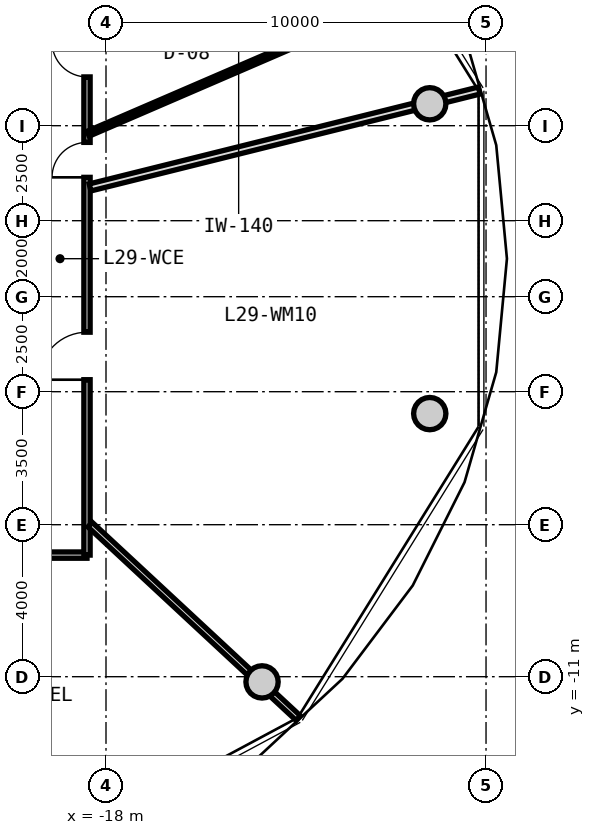
"""IFC4 building model, lengths in metres.
Left out: names, types, materials, properties, quantities, classifications, styles, units other than length and angle.
Written with IfcOpenShell. Run it as: python <this file> out.ifc"""

import sys

from ifc_helpers import new_model, si_unit, direction, frame, frame_2d, origin, origin_2d, place, context, subcontext, project, spatial, rectangle, circle, extrude, source, transform, mapped, element, fill, save


model = new_model("IFC4")
c1 = context("Model", 3, precision=1e-05, world=origin(), true_north=direction((0.0, 1.0)))
c2 = subcontext(c1, "Body", "Model", "MODEL_VIEW")
j1 = project(units=[si_unit("LENGTHUNIT", "METRE"), si_unit("PLANEANGLEUNIT", "RADIAN")], contexts=[c1])
p1 = place(None, origin())
s1 = spatial("IfcSite", under=j1, at=p1, CompositionType="ELEMENT")
p2 = place(p1, origin())
s2 = spatial("IfcBuilding", under=s1, at=p2, CompositionType="ELEMENT")
p3 = place(p2, frame((0.0, 0.0, 96.25)))
s3 = spatial("IfcBuildingStorey", under=s2, at=p3, CompositionType="ELEMENT", Elevation=96.25)
m1 = source(origin(), c2, "Body", "SweptSolid", [
    extrude(circle(Radius=0.425, at=origin_2d()), origin(), (0.0, 0.0, 1.0), 3.05),
])
for number, where, z_axis, x_axis in (
    (1, (-9.481, 4.076, 0.0), (0.0, 0.0, 1.0), (1.0, 0.0, 0.0)),
    (2, (-13.894, -11.137, 0.0), (0.0, 0.0, 1.0), (1.0, 0.0, 0.0)),
    (3, (-9.481, -4.076, 0.0), (0.0, 0.0, 1.0), (1.0, 0.0, 0.0)),
):
    element("IfcColumn", number, at=place(p3, frame(where, z_axis=z_axis, x_axis=x_axis)), inside=s3, PredefinedType="COLUMN", context=c2, shape_type="MappedRepresentation", body=[
        mapped(m1, transform((0.0, 0.0, 0.0), x_axis=(1.0, 0.0, 0.0), y_axis=(0.0, 1.0, 0.0), z_axis=(0.0, 0.0, 1.0), scale=1.0)),
    ])
m2 = source(origin(), c2, "Body", "SweptSolid", [
    extrude(rectangle(XDim=8.6, YDim=0.165, at=frame_2d((4.3, 0.0))), origin(), (0.0, 0.0, 1.0), 2.775),
])
p4 = place(p3, frame((-18.5, -7.8, 0.0), z_axis=(0.0, 0.0, 1.0), x_axis=(-1.0, 0.0, 0.0)))
e4 = element("IfcWall", 4, at=p4, inside=s3, PredefinedType="PARTITIONING", context=c2, shape_type="MappedRepresentation", body=[
    mapped(m2, transform((0.0, 0.0, 0.0), x_axis=(1.0, 0.0, 0.0), y_axis=(0.0, 1.0, 0.0), z_axis=(0.0, 0.0, 1.0), scale=1.0)),
])
p5 = place(p4, frame((3.775, 0.0, 0.0)))
e5 = element("IfcOpeningElement", 5, at=p5, cuts=e4, PredefinedType="OPENING", context=c2, shape_type="SweptSolid", body=[
    extrude(rectangle(XDim=1.05, YDim=2.15, at=frame_2d((0.525, 1.075))), frame((0.0, 0.093, 0.0), z_axis=(0.0, -1.0, 0.0), x_axis=(1.0, 0.0, 0.0)), (0.0, 0.0, 1.0), 0.185),
])
m3 = source(origin(), c2, "Body", "SweptSolid", [
    extrude(rectangle(XDim=15.6, YDim=0.165, at=frame_2d((7.8, 0.0))), origin(), (0.0, 0.0, 1.0), 2.775),
])
p6 = place(p3, frame((-18.5, 7.8, 0.0), z_axis=(0.0, 0.0, 1.0), x_axis=(0.0, -1.0, 0.0)))
e6 = element("IfcWall", 6, at=p6, inside=s3, PredefinedType="PARTITIONING", context=c2, shape_type="MappedRepresentation", body=[
    mapped(m3, transform((0.0, 0.0, 0.0), x_axis=(1.0, 0.0, 0.0), y_axis=(0.0, 1.0, 0.0), z_axis=(0.0, 0.0, 1.0), scale=1.0)),
])
p7 = place(p6, frame((9.734, 0.0, 0.0)))
e7 = element("IfcOpeningElement", 7, at=p7, cuts=e6, PredefinedType="OPENING", context=c2, shape_type="SweptSolid", body=[
    extrude(rectangle(XDim=1.25, YDim=2.2, at=frame_2d((0.625, 1.1))), frame((0.0, 0.093, 0.0), z_axis=(0.0, -1.0, 0.0), x_axis=(1.0, 0.0, 0.0)), (0.0, 0.0, 1.0), 0.185),
])
p8 = place(p6, frame((4.739, 0.0, 0.0)))
e8 = element("IfcOpeningElement", 8, at=p8, cuts=e6, PredefinedType="OPENING", context=c2, shape_type="SweptSolid", body=[
    extrude(rectangle(XDim=0.92, YDim=2.1, at=frame_2d((0.46, 1.05))), frame((0.0, 0.093, 0.0), z_axis=(0.0, -1.0, 0.0), x_axis=(1.0, 0.0, 0.0)), (0.0, 0.0, 1.0), 0.185),
])
p9 = place(p6, frame((2.096, 0.0, 0.0)))
e9 = element("IfcOpeningElement", 9, at=p9, cuts=e6, PredefinedType="OPENING", context=c2, shape_type="SweptSolid", body=[
    extrude(rectangle(XDim=0.92, YDim=2.1, at=frame_2d((0.46, 1.05))), frame((0.0, 0.093, 0.0), z_axis=(0.0, -1.0, 0.0), x_axis=(1.0, 0.0, 0.0)), (0.0, 0.0, 1.0), 0.185),
])
m4 = source(origin(), c2, "Body", "SweptSolid", [
    extrude(rectangle(XDim=7.482, YDim=0.165, at=frame_2d((3.741, 0.0))), origin(), (0.0, 0.0, 1.0), 2.275),
])
p10 = place(p3, frame((-18.42, -6.998, 0.0), z_axis=(0.0, 0.0, 1.0), x_axis=(0.732508698043, -0.680757671489, 0.0)))
e10 = element("IfcWall", 10, at=p10, inside=s3, PredefinedType="PARTITIONING", context=c2, shape_type="MappedRepresentation", body=[
    mapped(m4, transform((0.0, 0.0, 0.0), x_axis=(1.0, 0.0, 0.0), y_axis=(0.0, 1.0, 0.0), z_axis=(0.0, 0.0, 1.0), scale=1.0)),
])
m5 = source(origin(), c2, "Body", "SweptSolid", [
    extrude(rectangle(XDim=10.556, YDim=0.19, at=frame_2d((5.278, 0.0))), origin(), (0.0, 0.0, 1.0), 2.275),
])
p11 = place(p3, frame((-18.42, 1.875, 0.0), z_axis=(0.0, 0.0, 1.0), x_axis=(0.970363857851, 0.241648470667, 0.0)))
e11 = element("IfcWall", 11, at=p11, inside=s3, PredefinedType="PARTITIONING", context=c2, shape_type="MappedRepresentation", body=[
    mapped(m5, transform((0.0, 0.0, 0.0), x_axis=(1.0, 0.0, 0.0), y_axis=(0.0, 1.0, 0.0), z_axis=(0.0, 0.0, 1.0), scale=1.0)),
])
m6 = source(origin(), c2, "Body", "SweptSolid", [
    extrude(rectangle(XDim=9.447, YDim=0.14, at=frame_2d((4.724, 0.0))), origin(), (0.0, 0.0, 1.0), 2.775),
])
p12 = place(p3, frame((-18.47, 3.289, 0.0), z_axis=(0.0, 0.0, 1.0), x_axis=(0.918162367414, 0.396204324894, 0.0)))
e12 = element("IfcWall", 12, at=p12, inside=s3, PredefinedType="PARTITIONING", context=c2, shape_type="MappedRepresentation", body=[
    mapped(m6, transform((0.0, 0.0, 0.0), x_axis=(1.0, 0.0, 0.0), y_axis=(0.0, 1.0, 0.0), z_axis=(0.0, 0.0, 1.0), scale=1.0)),
])
m7 = source(origin(), c2, "Body", "SweptSolid", [
    extrude(rectangle(XDim=1.25, YDim=2.2, at=frame_2d((0.625, 1.1))), frame((0.0, 0.025, 0.0), z_axis=(0.0, -1.0, 0.0), x_axis=(1.0, 0.0, 0.0)), (0.0, 0.0, 1.0), 0.05),
])
p13 = place(p7, frame((1.25, 0.0, 0.0), z_axis=(0.0, 0.0, 1.0), x_axis=(-1.0, 0.0, 0.0)))
e13 = element("IfcDoor", 13, at=p13, inside=s3, OperationType="SINGLE_SWING_LEFT", PredefinedType="DOOR", context=c2, shape_type="MappedRepresentation", body=[
    mapped(m7, transform((0.0, 0.0, 0.0), x_axis=(1.0, 0.0, 0.0), y_axis=(0.0, 1.0, 0.0), z_axis=(0.0, 0.0, 1.0), scale=1.0)),
])
fill(e7, e13)
m8 = source(origin(), c2, "Body", "SweptSolid", [
    extrude(rectangle(XDim=0.92, YDim=2.1, at=frame_2d((0.46, 1.05))), frame((0.0, 0.025, 0.0), z_axis=(0.0, -1.0, 0.0), x_axis=(1.0, 0.0, 0.0)), (0.0, 0.0, 1.0), 0.05),
])
p14 = place(p8, frame((0.92, 0.0, 0.0), z_axis=(0.0, 0.0, 1.0), x_axis=(-1.0, 0.0, 0.0)))
e14 = element("IfcDoor", 14, at=p14, inside=s3, OperationType="SINGLE_SWING_LEFT", PredefinedType="DOOR", context=c2, shape_type="MappedRepresentation", body=[
    mapped(m8, transform((0.0, 0.0, 0.0), x_axis=(1.0, 0.0, 0.0), y_axis=(0.0, 1.0, 0.0), z_axis=(0.0, 0.0, 1.0), scale=1.0)),
])
fill(e8, e14)
p15 = place(p9, frame((0.92, 0.0, 0.0), z_axis=(0.0, 0.0, 1.0), x_axis=(-1.0, 0.0, 0.0)))
e15 = element("IfcDoor", 15, at=p15, inside=s3, OperationType="SINGLE_SWING_RIGHT", PredefinedType="DOOR", context=c2, shape_type="MappedRepresentation", body=[
    mapped(m8, transform((0.0, 0.0, 0.0), x_axis=(1.0, 0.0, 0.0), y_axis=(0.0, 1.0, 0.0), z_axis=(0.0, 0.0, 1.0), scale=1.0)),
])
fill(e9, e15)
save(model, sys.argv[1])
